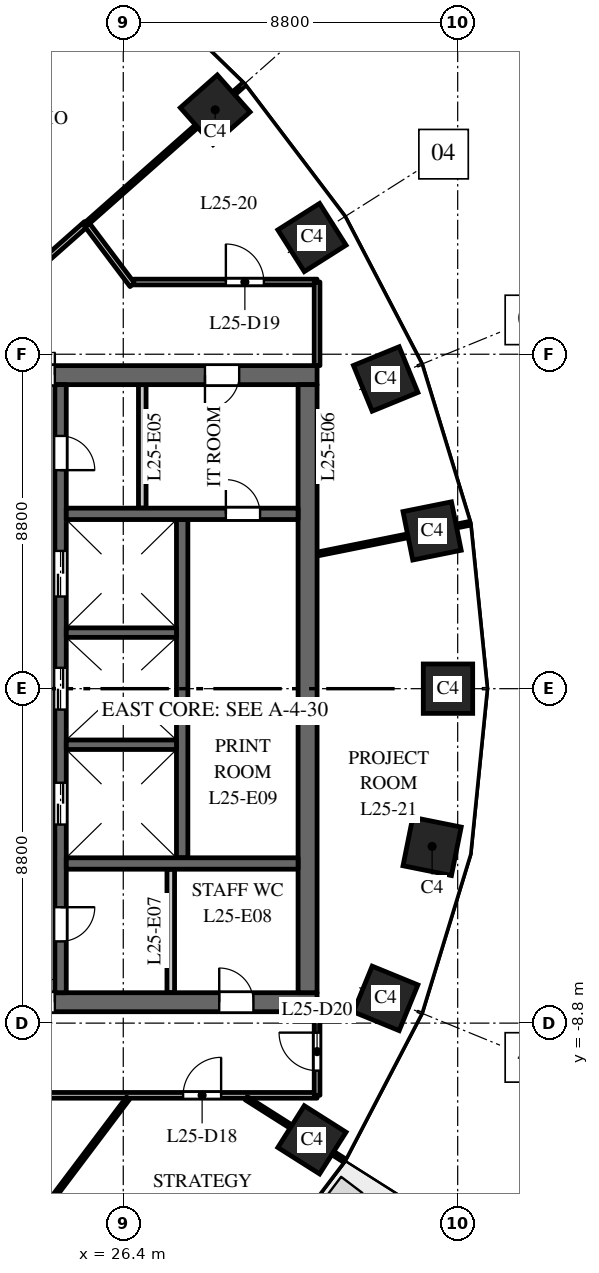
"""IFC4 building model, lengths in metres.
Left out: names, types, materials, properties, quantities, classifications, styles, units other than length and angle.
Written with IfcOpenShell. Run it as: python <this file> out.ifc"""

import sys

from ifc_helpers import new_model, si_unit, direction, frame, frame_2d, origin, origin_2d, place, context, subcontext, project, spatial, rectangle, extrude, element, fill, save


model = new_model("IFC4")
c1 = context("Model", 3, precision=1e-05, world=origin(), true_north=direction((0.0, 1.0)))
c2 = subcontext(c1, "Body", "Model", "MODEL_VIEW")
j1 = project(units=[si_unit("LENGTHUNIT", "METRE"), si_unit("PLANEANGLEUNIT", "RADIAN")], contexts=[c1])
p1 = place(None, origin())
s1 = spatial("IfcSite", under=j1, at=p1, CompositionType="ELEMENT")
p2 = place(p1, origin())
s2 = spatial("IfcBuilding", under=s1, at=p2, CompositionType="ELEMENT")
p3 = place(p2, frame((0.0, 0.0, 112.0)))
s3 = spatial("IfcBuildingStorey", under=s2, at=p3, CompositionType="ELEMENT", Elevation=112.0)
for number, where, z_axis, x_axis in (
    (1, (34.945, 0.0, 0.0), (0.0, 0.0, 1.0), (0.0, 1.0, 0.0)),
    (2, (34.527, 4.151, 0.0), (0.0, 0.0, 1.0), (-0.197, 0.98, 0.0)),
    (3, (33.305, 8.149, 0.0), (0.0, 0.0, 1.0), (-0.379, 0.925, 0.0)),
    (4, (31.365, 11.871, 0.0), (0.0, 0.0, 1.0), (-0.535, 0.845, 0.0)),
    (5, (28.819, 15.23, 0.0), (0.0, 0.0, 1.0), (-0.663, 0.749, 0.0)),
    (6, (31.365, -11.871, 0.0), (0.0, 0.0, 1.0), (0.535, 0.845, 0.0)),
    (7, (33.305, -8.149, 0.0), (0.0, 0.0, 1.0), (0.379, 0.925, 0.0)),
    (8, (34.527, -4.151, 0.0), (0.0, 0.0, 1.0), (0.197, 0.98, 0.0)),
):
    element("IfcColumn", number, at=place(p3, frame(where, z_axis=z_axis, x_axis=x_axis)), inside=s3, PredefinedType="COLUMN", context=c2, shape_type="SweptSolid", body=[
        extrude(rectangle(XDim=1.3, YDim=1.3, at=origin_2d()), origin(), (0.0, 0.0, 1.0), 4.0),
    ])
p4 = place(p3, frame((16.5, 8.25, 0.0), z_axis=(0.0, 0.0, 1.0), x_axis=(1.0, 0.0, 0.0)))
e9 = element("IfcWall", 9, at=p4, inside=s3, PredefinedType="SHEAR", context=c2, shape_type="SweptSolid", body=[
    extrude(rectangle(XDim=15.0, YDim=0.5, at=frame_2d((7.5, 0.0))), origin(), (0.0, 0.0, 1.0), 3.7),
])
p5 = place(p4, frame((6.9, 0.0, 0.0)))
e10 = element("IfcOpeningElement", 10, at=p5, cuts=e9, PredefinedType="OPENING", context=c2, shape_type="SweptSolid", body=[
    extrude(rectangle(XDim=1.2, YDim=2.1, at=frame_2d((0.6, 1.05))), frame((0.0, 0.26, 0.0), z_axis=(0.0, -1.0, 0.0), x_axis=(1.0, 0.0, 0.0)), (0.0, 0.0, 1.0), 0.52),
])
p6 = place(p4, frame((12.05, 0.0, 0.0)))
e11 = element("IfcOpeningElement", 11, at=p6, cuts=e9, PredefinedType="OPENING", context=c2, shape_type="SweptSolid", body=[
    extrude(rectangle(XDim=0.9, YDim=2.1, at=frame_2d((0.45, 1.05))), frame((0.0, 0.26, 0.0), z_axis=(0.0, -1.0, 0.0), x_axis=(1.0, 0.0, 0.0)), (0.0, 0.0, 1.0), 0.52),
])
p7 = place(p3, frame((16.5, -8.25, 0.0), z_axis=(0.0, 0.0, 1.0), x_axis=(1.0, 0.0, 0.0)))
e12 = element("IfcWall", 12, at=p7, inside=s3, PredefinedType="SHEAR", context=c2, shape_type="SweptSolid", body=[
    extrude(rectangle(XDim=15.0, YDim=0.5, at=frame_2d((7.5, 0.0))), origin(), (0.0, 0.0, 1.0), 3.7),
])
p8 = place(p7, frame((6.9, 0.0, 0.0)))
e13 = element("IfcOpeningElement", 13, at=p8, cuts=e12, PredefinedType="OPENING", context=c2, shape_type="SweptSolid", body=[
    extrude(rectangle(XDim=1.2, YDim=2.1, at=frame_2d((0.6, 1.05))), frame((0.0, 0.26, 0.0), z_axis=(0.0, -1.0, 0.0), x_axis=(1.0, 0.0, 0.0)), (0.0, 0.0, 1.0), 0.52),
])
p9 = place(p7, frame((12.425, 0.0, 0.0)))
e14 = element("IfcOpeningElement", 14, at=p9, cuts=e12, PredefinedType="OPENING", context=c2, shape_type="SweptSolid", body=[
    extrude(rectangle(XDim=0.9, YDim=2.1, at=frame_2d((0.45, 1.05))), frame((0.0, 0.26, 0.0), z_axis=(0.0, -1.0, 0.0), x_axis=(1.0, 0.0, 0.0)), (0.0, 0.0, 1.0), 0.52),
])
p10 = place(p3, frame((27.95, -4.45, 0.0), z_axis=(0.0, 0.0, 1.0), x_axis=(0.0, 1.0, 0.0)))
e15 = element("IfcWall", 15, at=p10, inside=s3, PredefinedType="SHEAR", context=c2, shape_type="SweptSolid", body=[
    extrude(rectangle(XDim=8.9, YDim=0.3, at=frame_2d((4.45, 0.0))), origin(), (0.0, 0.0, 1.0), 3.7),
])
p11 = place(p3, frame((24.75, -8.0, 0.0), z_axis=(0.0, 0.0, 1.0), x_axis=(0.0, 1.0, 0.0)))
e16 = element("IfcWall", 16, at=p11, inside=s3, PredefinedType="SHEAR", context=c2, shape_type="SweptSolid", body=[
    extrude(rectangle(XDim=16.0, YDim=0.3, at=frame_2d((8.0, 0.0))), origin(), (0.0, 0.0, 1.0), 3.7),
])
p12 = place(p11, frame((4.425, 0.0, 0.0)))
e17 = element("IfcOpeningElement", 17, at=p12, cuts=e16, PredefinedType="OPENING", context=c2, shape_type="SweptSolid", body=[
    extrude(rectangle(XDim=1.1, YDim=2.1, at=frame_2d((0.55, 1.05))), frame((0.0, 0.16, 0.0), z_axis=(0.0, -1.0, 0.0), x_axis=(1.0, 0.0, 0.0)), (0.0, 0.0, 1.0), 0.32),
])
p13 = place(p11, frame((7.45, 0.0, 0.0)))
e18 = element("IfcOpeningElement", 18, at=p13, cuts=e16, PredefinedType="OPENING", context=c2, shape_type="SweptSolid", body=[
    extrude(rectangle(XDim=1.1, YDim=2.1, at=frame_2d((0.55, 1.05))), frame((0.0, 0.16, 0.0), z_axis=(0.0, -1.0, 0.0), x_axis=(1.0, 0.0, 0.0)), (0.0, 0.0, 1.0), 0.32),
])
p14 = place(p11, frame((10.425, 0.0, 0.0)))
e19 = element("IfcOpeningElement", 19, at=p14, cuts=e16, PredefinedType="OPENING", context=c2, shape_type="SweptSolid", body=[
    extrude(rectangle(XDim=1.2, YDim=2.1, at=frame_2d((0.6, 1.05))), frame((0.0, 0.16, 0.0), z_axis=(0.0, -1.0, 0.0), x_axis=(1.0, 0.0, 0.0)), (0.0, 0.0, 1.0), 0.32),
])
p15 = place(p11, frame((13.75, 0.0, 0.0)))
e20 = element("IfcOpeningElement", 20, at=p15, cuts=e16, PredefinedType="OPENING", context=c2, shape_type="SweptSolid", body=[
    extrude(rectangle(XDim=0.9, YDim=2.1, at=frame_2d((0.45, 1.05))), frame((0.0, 0.16, 0.0), z_axis=(0.0, -1.0, 0.0), x_axis=(1.0, 0.0, 0.0)), (0.0, 0.0, 1.0), 0.32),
])
p16 = place(p11, frame((1.35, 0.0, 0.0)))
e21 = element("IfcOpeningElement", 21, at=p16, cuts=e16, PredefinedType="OPENING", context=c2, shape_type="SweptSolid", body=[
    extrude(rectangle(XDim=0.9, YDim=2.1, at=frame_2d((0.45, 1.05))), frame((0.0, 0.16, 0.0), z_axis=(0.0, -1.0, 0.0), x_axis=(1.0, 0.0, 0.0)), (0.0, 0.0, 1.0), 0.32),
])
p17 = place(p3, frame((31.25, -8.0, 0.0), z_axis=(0.0, 0.0, 1.0), x_axis=(0.0, 1.0, 0.0)))
e22 = element("IfcWall", 22, at=p17, inside=s3, PredefinedType="SHEAR", context=c2, shape_type="SweptSolid", body=[
    extrude(rectangle(XDim=16.0, YDim=0.5, at=frame_2d((8.0, 0.0))), origin(), (0.0, 0.0, 1.0), 3.7),
])
p18 = place(p3, frame((24.9, 4.6, 0.0), z_axis=(0.0, 0.0, 1.0), x_axis=(1.0, 0.0, 0.0)))
e23 = element("IfcWall", 23, at=p18, inside=s3, PredefinedType="SHEAR", context=c2, shape_type="SweptSolid", body=[
    extrude(rectangle(XDim=6.1, YDim=0.3, at=frame_2d((3.05, 0.0))), origin(), (0.0, 0.0, 1.0), 3.7),
])
p19 = place(p18, frame((4.2, 0.0, 0.0)))
e24 = element("IfcOpeningElement", 24, at=p19, cuts=e23, PredefinedType="OPENING", context=c2, shape_type="SweptSolid", body=[
    extrude(rectangle(XDim=0.9, YDim=2.1, at=frame_2d((0.45, 1.05))), frame((0.0, 0.16, 0.0), z_axis=(0.0, -1.0, 0.0), x_axis=(1.0, 0.0, 0.0)), (0.0, 0.0, 1.0), 0.32),
])
for number, where, z_axis, x_axis in (
    (25, (26.9, 4.75, 0.0), (0.0, 0.0, 1.0), (0.0, 1.0, 0.0)),
    (26, (27.65, -8.0, 0.0), (0.0, 0.0, 1.0), (0.0, 1.0, 0.0)),
):
    element("IfcWall", number, at=place(p3, frame(where, z_axis=z_axis, x_axis=x_axis)), inside=s3, PredefinedType="PARTITIONING", context=c2, shape_type="SweptSolid", body=[
        extrude(rectangle(XDim=3.25, YDim=0.2, at=frame_2d((1.625, 0.0))), origin(), (0.0, 0.0, 1.0), 3.7),
    ])
p20 = place(p3, frame((24.9, -4.6, 0.0), z_axis=(0.0, 0.0, 1.0), x_axis=(1.0, 0.0, 0.0)))
e27 = element("IfcWall", 27, at=p20, inside=s3, PredefinedType="SHEAR", context=c2, shape_type="SweptSolid", body=[
    extrude(rectangle(XDim=6.1, YDim=0.3, at=frame_2d((3.05, 0.0))), origin(), (0.0, 0.0, 1.0), 3.7),
])
for number, where, z_axis, x_axis in (
    (28, (24.9, -1.475, 0.0), (0.0, 0.0, 1.0), (1.0, 0.0, 0.0)),
    (29, (24.9, 1.475, 0.0), (0.0, 0.0, 1.0), (1.0, 0.0, 0.0)),
):
    element("IfcWall", number, at=place(p3, frame(where, z_axis=z_axis, x_axis=x_axis)), inside=s3, PredefinedType="SHEAR", context=c2, shape_type="SweptSolid", body=[
        extrude(rectangle(XDim=2.9, YDim=0.25, at=frame_2d((1.45, 0.0))), origin(), (0.0, 0.0, 1.0), 3.7),
    ])
p21 = place(p3, frame((20.603, -10.7, 0.0), z_axis=(0.0, 0.0, 1.0), x_axis=(1.0, 0.0, 0.0)))
e30 = element("IfcWall", 30, at=p21, inside=s3, PredefinedType="PARTITIONING", context=c2, shape_type="SweptSolid", body=[
    extrude(rectangle(XDim=10.897, YDim=0.15, at=frame_2d((5.448, 0.0))), origin(), (0.0, 0.0, 1.0), 2.9),
])
p22 = place(p21, frame((0.542, 0.0, 0.0)))
e31 = element("IfcOpeningElement", 31, at=p22, cuts=e30, PredefinedType="OPENING", context=c2, shape_type="SweptSolid", body=[
    extrude(rectangle(XDim=1.0, YDim=2.1, at=frame_2d((0.5, 1.05))), frame((0.0, 0.085, 0.0), z_axis=(0.0, -1.0, 0.0), x_axis=(1.0, 0.0, 0.0)), (0.0, 0.0, 1.0), 0.17),
])
p23 = place(p21, frame((7.372, 0.0, 0.0)))
e32 = element("IfcOpeningElement", 32, at=p23, cuts=e30, PredefinedType="OPENING", context=c2, shape_type="SweptSolid", body=[
    extrude(rectangle(XDim=1.0, YDim=2.1, at=frame_2d((0.5, 1.05))), frame((0.0, 0.085, 0.0), z_axis=(0.0, -1.0, 0.0), x_axis=(1.0, 0.0, 0.0)), (0.0, 0.0, 1.0), 0.17),
])
p24 = place(p3, frame((23.298, -15.06, 0.0), z_axis=(0.0, 0.0, 1.0), x_axis=(0.601658833238, 0.798753183647, 0.0)))
e33 = element("IfcWall", 33, at=p24, inside=s3, PredefinedType="PARTITIONING", context=c2, shape_type="SweptSolid", body=[
    extrude(rectangle(XDim=5.365, YDim=0.1, at=frame_2d((2.682, 0.0))), origin(), (0.0, 0.0, 1.0), 2.75),
])
p25 = place(p3, frame((23.785, 10.778, 0.0), z_axis=(0.0, 0.0, 1.0), x_axis=(0.748911595987, 0.662669918886, 0.0)))
e34 = element("IfcWall", 34, at=p25, inside=s3, PredefinedType="PARTITIONING", context=c2, shape_type="SweptSolid", body=[
    extrude(rectangle(XDim=2.194, YDim=0.15, at=frame_2d((1.097, 0.0))), origin(), (0.0, 0.0, 1.0), 3.7),
])
p26 = place(p3, frame((25.428, 12.232, 0.0), z_axis=(0.0, 0.0, 1.0), x_axis=(0.601513631979, -0.798862535449, 0.0)))
e35 = element("IfcWall", 35, at=p26, inside=s3, PredefinedType="PARTITIONING", context=c2, shape_type="SweptSolid", body=[
    extrude(rectangle(XDim=2.011, YDim=0.15, at=frame_2d((1.006, 0.0))), origin(), (0.0, 0.0, 1.0), 3.7),
])
p27 = place(p3, frame((25.428, 12.232, 0.0), z_axis=(0.0, 0.0, 1.0), x_axis=(0.749015105068, 0.662552920437, 0.0)))
e36 = element("IfcWall", 36, at=p27, inside=s3, PredefinedType="PARTITIONING", context=c2, shape_type="SweptSolid", body=[
    extrude(rectangle(XDim=5.529, YDim=0.1, at=frame_2d((2.764, 0.0))), origin(), (0.0, 0.0, 1.0), 3.7),
])
p28 = place(p3, frame((26.676, 10.7, 0.0), z_axis=(0.0, 0.0, 1.0), x_axis=(1.0, 0.0, 0.0)))
e37 = element("IfcWall", 37, at=p28, inside=s3, PredefinedType="PARTITIONING", context=c2, shape_type="SweptSolid", body=[
    extrude(rectangle(XDim=4.824, YDim=0.15, at=frame_2d((2.412, 0.0))), origin(), (0.0, 0.0, 1.0), 2.9),
])
p29 = place(p28, frame((2.424, 0.0, 0.0)))
e38 = element("IfcOpeningElement", 38, at=p29, cuts=e37, PredefinedType="OPENING", context=c2, shape_type="SweptSolid", body=[
    extrude(rectangle(XDim=1.0, YDim=2.1, at=frame_2d((0.5, 1.05))), frame((0.0, 0.085, 0.0), z_axis=(0.0, -1.0, 0.0), x_axis=(1.0, 0.0, 0.0)), (0.0, 0.0, 1.0), 0.17),
])
p30 = place(p3, frame((29.637, -10.777, 0.0), z_axis=(0.0, 0.0, 1.0), x_axis=(0.844810627195, -0.535065420467, 0.0)))
e39 = element("IfcWall", 39, at=p30, inside=s3, PredefinedType="PARTITIONING", context=c2, shape_type="SweptSolid", body=[
    extrude(rectangle(XDim=3.048, YDim=0.1, at=frame_2d((1.524, 0.0))), origin(), (0.0, 0.0, 1.0), 2.9),
])
p31 = place(p3, frame((31.5, -10.7, 0.0), z_axis=(0.0, 0.0, 1.0), x_axis=(0.0, 1.0, 0.0)))
e40 = element("IfcWall", 40, at=p31, inside=s3, PredefinedType="PARTITIONING", context=c2, shape_type="SweptSolid", body=[
    extrude(rectangle(XDim=2.2, YDim=0.15, at=frame_2d((1.1, 0.0))), origin(), (0.0, 0.0, 1.0), 2.9),
])
p32 = place(p31, frame((0.65, 0.0, 0.0)))
e41 = element("IfcOpeningElement", 41, at=p32, cuts=e40, PredefinedType="OPENING", context=c2, shape_type="SweptSolid", body=[
    extrude(rectangle(XDim=1.0, YDim=2.1, at=frame_2d((0.5, 1.05))), frame((0.0, 0.085, 0.0), z_axis=(0.0, -1.0, 0.0), x_axis=(1.0, 0.0, 0.0)), (0.0, 0.0, 1.0), 0.17),
])
p33 = place(p3, frame((31.5, 3.542, 0.0), z_axis=(0.0, 0.0, 1.0), x_axis=(0.980357474535, 0.197228857227, 0.0)))
e42 = element("IfcWall", 42, at=p33, inside=s3, PredefinedType="PARTITIONING", context=c2, shape_type="SweptSolid", body=[
    extrude(rectangle(XDim=4.092, YDim=0.1, at=frame_2d((2.046, 0.0))), origin(), (0.0, 0.0, 1.0), 2.9),
])
p34 = place(p3, frame((31.5, 8.5, 0.0), z_axis=(0.0, 0.0, 1.0), x_axis=(0.0, 1.0, 0.0)))
e43 = element("IfcWall", 43, at=p34, inside=s3, PredefinedType="PARTITIONING", context=c2, shape_type="SweptSolid", body=[
    extrude(rectangle(XDim=2.2, YDim=0.15, at=frame_2d((1.1, 0.0))), origin(), (0.0, 0.0, 1.0), 2.9),
])
p35 = place(p12, origin())
e44 = element("IfcDoor", 44, at=p35, inside=s3, OperationType="DOUBLE_DOOR_SLIDING", PredefinedType="DOOR", context=c2, shape_type="SweptSolid", body=[
    extrude(rectangle(XDim=1.1, YDim=2.1, at=frame_2d((0.55, 1.05))), frame((0.0, 0.025, 0.0), z_axis=(0.0, -1.0, 0.0), x_axis=(1.0, 0.0, 0.0)), (0.0, 0.0, 1.0), 0.05),
])
fill(e17, e44)
p36 = place(p13, origin())
e45 = element("IfcDoor", 45, at=p36, inside=s3, OperationType="DOUBLE_DOOR_SLIDING", PredefinedType="DOOR", context=c2, shape_type="SweptSolid", body=[
    extrude(rectangle(XDim=1.1, YDim=2.1, at=frame_2d((0.55, 1.05))), frame((0.0, 0.025, 0.0), z_axis=(0.0, -1.0, 0.0), x_axis=(1.0, 0.0, 0.0)), (0.0, 0.0, 1.0), 0.05),
])
fill(e18, e45)
p37 = place(p14, origin())
e46 = element("IfcDoor", 46, at=p37, inside=s3, OperationType="DOUBLE_DOOR_SLIDING", PredefinedType="DOOR", context=c2, shape_type="SweptSolid", body=[
    extrude(rectangle(XDim=1.2, YDim=2.1, at=frame_2d((0.6, 1.05))), frame((0.0, 0.025, 0.0), z_axis=(0.0, -1.0, 0.0), x_axis=(1.0, 0.0, 0.0)), (0.0, 0.0, 1.0), 0.05),
])
fill(e19, e46)
p38 = place(p5, origin())
e47 = element("IfcDoor", 47, at=p38, inside=s3, OperationType="DOUBLE_DOOR_DOUBLE_SWING", PredefinedType="DOOR", context=c2, shape_type="SweptSolid", body=[
    extrude(rectangle(XDim=1.2, YDim=2.1, at=frame_2d((0.6, 1.05))), frame((0.0, 0.025, 0.0), z_axis=(0.0, -1.0, 0.0), x_axis=(1.0, 0.0, 0.0)), (0.0, 0.0, 1.0), 0.05),
])
fill(e10, e47)
p39 = place(p8, origin())
e48 = element("IfcDoor", 48, at=p39, inside=s3, OperationType="DOUBLE_DOOR_DOUBLE_SWING", PredefinedType="DOOR", context=c2, shape_type="SweptSolid", body=[
    extrude(rectangle(XDim=1.2, YDim=2.1, at=frame_2d((0.6, 1.05))), frame((0.0, 0.025, 0.0), z_axis=(0.0, -1.0, 0.0), x_axis=(1.0, 0.0, 0.0)), (0.0, 0.0, 1.0), 0.05),
])
fill(e13, e48)
p40 = place(p15, origin())
e49 = element("IfcDoor", 49, at=p40, inside=s3, OperationType="SINGLE_SWING_LEFT", PredefinedType="DOOR", context=c2, shape_type="SweptSolid", body=[
    extrude(rectangle(XDim=0.9, YDim=2.1, at=frame_2d((0.45, 1.05))), frame((0.0, 0.025, 0.0), z_axis=(0.0, -1.0, 0.0), x_axis=(1.0, 0.0, 0.0)), (0.0, 0.0, 1.0), 0.05),
])
fill(e20, e49)
p41 = place(p6, origin())
e50 = element("IfcDoor", 50, at=p41, inside=s3, OperationType="SINGLE_SWING_LEFT", PredefinedType="DOOR", context=c2, shape_type="SweptSolid", body=[
    extrude(rectangle(XDim=0.9, YDim=2.1, at=frame_2d((0.45, 1.05))), frame((0.0, 0.025, 0.0), z_axis=(0.0, -1.0, 0.0), x_axis=(1.0, 0.0, 0.0)), (0.0, 0.0, 1.0), 0.05),
])
fill(e11, e50)
p42 = place(p16, origin())
e51 = element("IfcDoor", 51, at=p42, inside=s3, OperationType="SINGLE_SWING_RIGHT", PredefinedType="DOOR", context=c2, shape_type="SweptSolid", body=[
    extrude(rectangle(XDim=0.9, YDim=2.1, at=frame_2d((0.45, 1.05))), frame((0.0, 0.025, 0.0), z_axis=(0.0, -1.0, 0.0), x_axis=(1.0, 0.0, 0.0)), (0.0, 0.0, 1.0), 0.05),
])
fill(e21, e51)
p43 = place(p9, origin())
e52 = element("IfcDoor", 52, at=p43, inside=s3, OperationType="SINGLE_SWING_RIGHT", PredefinedType="DOOR", context=c2, shape_type="SweptSolid", body=[
    extrude(rectangle(XDim=0.9, YDim=2.1, at=frame_2d((0.45, 1.05))), frame((0.0, 0.025, 0.0), z_axis=(0.0, -1.0, 0.0), x_axis=(1.0, 0.0, 0.0)), (0.0, 0.0, 1.0), 0.05),
])
fill(e14, e52)
p44 = place(p19, origin())
e53 = element("IfcDoor", 53, at=p44, inside=s3, OperationType="SINGLE_SWING_RIGHT", PredefinedType="DOOR", context=c2, shape_type="SweptSolid", body=[
    extrude(rectangle(XDim=0.9, YDim=2.1, at=frame_2d((0.45, 1.05))), frame((0.0, 0.025, 0.0), z_axis=(0.0, -1.0, 0.0), x_axis=(1.0, 0.0, 0.0)), (0.0, 0.0, 1.0), 0.05),
])
fill(e24, e53)
p45 = place(p23, origin())
e54 = element("IfcDoor", 54, at=p45, inside=s3, OperationType="SINGLE_SWING_RIGHT", PredefinedType="DOOR", context=c2, shape_type="SweptSolid", body=[
    extrude(rectangle(XDim=1.0, YDim=2.1, at=frame_2d((0.5, 1.05))), frame((0.0, 0.025, 0.0), z_axis=(0.0, -1.0, 0.0), x_axis=(1.0, 0.0, 0.0)), (0.0, 0.0, 1.0), 0.05),
])
fill(e32, e54)
p46 = place(p29, origin())
e55 = element("IfcDoor", 55, at=p46, inside=s3, OperationType="SINGLE_SWING_LEFT", PredefinedType="DOOR", context=c2, shape_type="SweptSolid", body=[
    extrude(rectangle(XDim=1.0, YDim=2.1, at=frame_2d((0.5, 1.05))), frame((0.0, 0.025, 0.0), z_axis=(0.0, -1.0, 0.0), x_axis=(1.0, 0.0, 0.0)), (0.0, 0.0, 1.0), 0.05),
])
fill(e38, e55)
p47 = place(p32, origin())
e56 = element("IfcDoor", 56, at=p47, inside=s3, OperationType="SINGLE_SWING_RIGHT", PredefinedType="DOOR", context=c2, shape_type="SweptSolid", body=[
    extrude(rectangle(XDim=1.0, YDim=2.1, at=frame_2d((0.5, 1.05))), frame((0.0, 0.025, 0.0), z_axis=(0.0, -1.0, 0.0), x_axis=(1.0, 0.0, 0.0)), (0.0, 0.0, 1.0), 0.05),
])
fill(e41, e56)
save(model, sys.argv[1])
